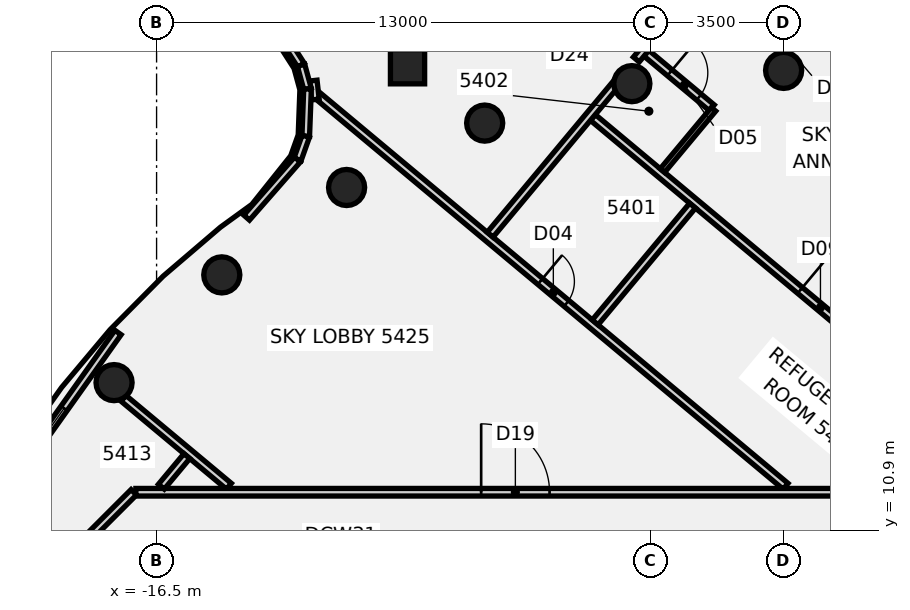
"""IFC4 building model, lengths in metres.
Left out: names, types, materials, properties, quantities, classifications, styles, units other than length and angle.
Written with IfcOpenShell. Run it as: python <this file> out.ifc"""

import sys

from ifc_helpers import new_model, si_unit, direction, frame, frame_2d, origin, origin_2d, place, context, subcontext, project, spatial, rectangle, circle, extrude, element, fill, save


model = new_model("IFC4")
c1 = context("Model", 3, precision=1e-05, world=origin(), true_north=direction((0.0, 1.0)))
c2 = subcontext(c1, "Body", "Model", "MODEL_VIEW")
j1 = project(units=[si_unit("LENGTHUNIT", "METRE"), si_unit("PLANEANGLEUNIT", "RADIAN")], contexts=[c1])
p1 = place(None, origin())
s1 = spatial("IfcSite", under=j1, at=p1, CompositionType="ELEMENT")
p2 = place(p1, origin())
s2 = spatial("IfcBuilding", under=s1, at=p2, CompositionType="ELEMENT")
p3 = place(p2, frame((0.0, 0.0, 214.9)))
s3 = spatial("IfcBuildingStorey", under=s2, at=p3, CompositionType="ELEMENT", Elevation=214.9)
for number, where, z_axis, x_axis in (
    (1, (0.0, 23.0, -0.18), (0.0, 0.0, 1.0), (1.0, 0.0, 0.0)),
    (2, (-3.994, 22.651, -0.18), (0.0, 0.0, 1.0), (1.0, 0.0, 0.0)),
    (3, (-7.866, 21.613, -0.18), (0.0, 0.0, 1.0), (1.0, 0.0, 0.0)),
    (4, (-11.5, 19.919, -0.18), (0.0, 0.0, 1.0), (1.0, 0.0, 0.0)),
    (5, (-14.784, 17.619, -0.18), (0.0, 0.0, 1.0), (1.0, 0.0, 0.0)),
    (6, (-17.619, 14.784, -0.18), (0.0, 0.0, 1.0), (1.0, 0.0, 0.0)),
):
    element("IfcColumn", number, at=place(p3, frame(where, z_axis=z_axis, x_axis=x_axis)), inside=s3, PredefinedType="COLUMN", context=c2, shape_type="SweptSolid", body=[
        extrude(circle(Radius=0.475, at=origin_2d()), origin(), (0.0, 0.0, 1.0), 5.04),
    ])
p4 = place(p3, frame((-9.896, 23.096, -0.174), z_axis=(-0.00363877131, -0.03580550969, 0.999352152556), x_axis=(0.640801875223, 0.767126989756, 0.029818422132)))
e7 = element("IfcColumn", 7, at=p4, inside=s3, PredefinedType="COLUMN", context=c2, shape_type="SweptSolid", body=[
    extrude(rectangle(XDim=0.9, YDim=0.9, at=origin_2d()), origin(), (0.0, 0.0, 1.0), 5.032),
])
p5 = place(p3, frame((-17.37, 14.371, 0.0), z_axis=(0.0, 0.0, 1.0), x_axis=(0.767916419385, -0.640550054905, 0.0)))
e8 = element("IfcWall", 8, at=p5, inside=s3, PredefinedType="PARTITIONING", context=c2, shape_type="SweptSolid", body=[
    extrude(rectangle(XDim=3.611, YDim=0.2, at=frame_2d((1.806, 0.0))), origin(), (0.0, 0.0, 1.0), 4.16),
])
p6 = place(p3, frame((-12.256, 22.329, 0.0), z_axis=(0.0, 0.0, 1.0), x_axis=(0.767726730688, -0.640777392693, 0.0)))
e9 = element("IfcWall", 9, at=p6, inside=s3, PredefinedType="PARTITIONING", context=c2, shape_type="SweptSolid", body=[
    extrude(rectangle(XDim=16.031, YDim=0.2, at=frame_2d((8.016, 0.0))), origin(), (0.0, 0.0, 1.0), 4.16),
])
p7 = place(p6, frame((7.62, 0.0, 0.0)))
e10 = element("IfcOpeningElement", 10, at=p7, cuts=e9, PredefinedType="OPENING", context=c2, shape_type="SweptSolid", body=[
    extrude(rectangle(XDim=0.9, YDim=2.1, at=frame_2d((0.45, 1.05))), frame((0.0, 0.11, 0.0), z_axis=(0.0, -1.0, 0.0), x_axis=(1.0, 0.0, 0.0)), (0.0, 0.0, 1.0), 0.22),
])
p8 = place(p3, frame((-10.519, 29.217, 0.0), z_axis=(0.0, 0.0, 1.0), x_axis=(0.767759961509, -0.640737576161, 0.0)))
e11 = element("IfcWall", 11, at=p8, inside=s3, PredefinedType="PARTITIONING", context=c2, shape_type="SweptSolid", body=[
    extrude(rectangle(XDim=11.24, YDim=0.2, at=frame_2d((5.62, 0.0))), origin(), (0.0, 0.0, 1.0), 4.16),
])
p9 = place(p8, frame((9.8, 0.0, 0.0)))
e12 = element("IfcOpeningElement", 12, at=p9, cuts=e11, PredefinedType="OPENING", context=c2, shape_type="SweptSolid", body=[
    extrude(rectangle(XDim=1.0, YDim=2.1, at=frame_2d((0.5, 1.05))), frame((0.0, 0.11, 0.0), z_axis=(0.0, -1.0, 0.0), x_axis=(1.0, 0.0, 0.0)), (0.0, 0.0, 1.0), 0.22),
])
p10 = place(p8, frame((4.7, 0.0, 0.0)))
e13 = element("IfcOpeningElement", 13, at=p10, cuts=e11, PredefinedType="OPENING", context=c2, shape_type="SweptSolid", body=[
    extrude(rectangle(XDim=1.8, YDim=2.1, at=frame_2d((0.9, 1.05))), frame((0.0, 0.11, 0.0), z_axis=(0.0, -1.0, 0.0), x_axis=(1.0, 0.0, 0.0)), (0.0, 0.0, 1.0), 0.22),
])
p11 = place(p3, frame((-5.019, 21.761, 0.0), z_axis=(0.0, 0.0, 1.0), x_axis=(0.767714934774, -0.640791525323, 0.0)))
e14 = element("IfcWall", 14, at=p11, inside=s3, PredefinedType="PARTITIONING", context=c2, shape_type="SweptSolid", body=[
    extrude(rectangle(XDim=15.144, YDim=0.2, at=frame_2d((7.572, 0.0))), origin(), (0.0, 0.0, 1.0), 4.16),
])
p12 = place(p11, frame((7.1, 0.0, 0.0)))
e15 = element("IfcOpeningElement", 15, at=p12, cuts=e14, PredefinedType="OPENING", context=c2, shape_type="SweptSolid", body=[
    extrude(rectangle(XDim=1.4, YDim=2.1, at=frame_2d((0.7, 1.05))), frame((0.0, 0.11, 0.0), z_axis=(0.0, -1.0, 0.0), x_axis=(1.0, 0.0, 0.0)), (0.0, 0.0, 1.0), 0.22),
])
p13 = place(p3, frame((-0.662, 26.981, 0.0), z_axis=(0.0, 0.0, 1.0), x_axis=(0.767770033975, -0.640725506695, 0.0)))
e16 = element("IfcWall", 16, at=p13, inside=s3, PredefinedType="PARTITIONING", context=c2, shape_type="SweptSolid", body=[
    extrude(rectangle(XDim=6.123, YDim=0.2, at=frame_2d((3.061, 0.0))), origin(), (0.0, 0.0, 1.0), 4.16),
])
p14 = place(p13, frame((2.45, 0.0, 0.0)))
e17 = element("IfcOpeningElement", 17, at=p14, cuts=e16, PredefinedType="OPENING", context=c2, shape_type="SweptSolid", body=[
    extrude(rectangle(XDim=0.9, YDim=2.1, at=frame_2d((0.45, 1.05))), frame((0.0, 0.11, 0.0), z_axis=(0.0, -1.0, 0.0), x_axis=(1.0, 0.0, 0.0)), (0.0, 0.0, 1.0), 0.22),
])
p15 = place(p3, frame((-17.045, 11.9, 0.0), z_axis=(0.0, 0.0, 1.0), x_axis=(1.0, 0.0, 0.0)))
e18 = element("IfcWall", 18, at=p15, inside=s3, PredefinedType="PARTITIONING", context=c2, shape_type="SweptSolid", body=[
    extrude(rectangle(XDim=34.145, YDim=0.2, at=frame_2d((17.073, 0.0))), origin(), (0.0, 0.0, 1.0), 4.16),
])
p16 = place(p15, frame((24.44, 0.0, 0.0)))
e19 = element("IfcOpeningElement", 19, at=p16, cuts=e18, PredefinedType="OPENING", context=c2, shape_type="SweptSolid", body=[
    extrude(rectangle(XDim=1.8, YDim=2.1, at=frame_2d((0.9, 1.05))), frame((0.0, 0.11, 0.0), z_axis=(0.0, -1.0, 0.0), x_axis=(1.0, 0.0, 0.0)), (0.0, 0.0, 1.0), 0.22),
])
p17 = place(p15, frame((9.086, 0.0, 0.0)))
e20 = element("IfcOpeningElement", 20, at=p17, cuts=e18, PredefinedType="OPENING", context=c2, shape_type="SweptSolid", body=[
    extrude(rectangle(XDim=1.8, YDim=2.1, at=frame_2d((0.9, 1.05))), frame((0.0, 0.11, 0.0), z_axis=(0.0, -1.0, 0.0), x_axis=(1.0, 0.0, 0.0)), (0.0, 0.0, 1.0), 0.22),
])
p18 = place(p3, frame((-18.858, 10.142, 0.0), z_axis=(0.0, 0.0, 1.0), x_axis=(0.707106781187, 0.707106781187, 0.0)))
e21 = element("IfcWall", 21, at=p18, inside=s3, PredefinedType="PARTITIONING", context=c2, shape_type="SweptSolid", body=[
    extrude(rectangle(XDim=2.486, YDim=0.2, at=frame_2d((1.243, 0.0))), origin(), (0.0, 0.0, 1.0), 4.16),
])
p19 = place(p3, frame((-16.375, 12.046, 0.0), z_axis=(0.0, 0.0, 1.0), x_axis=(0.640757178851, 0.767743601569, 0.0)))
e22 = element("IfcWall", 22, at=p19, inside=s3, PredefinedType="PARTITIONING", context=c2, shape_type="SweptSolid", body=[
    extrude(rectangle(XDim=1.048, YDim=0.2, at=frame_2d((0.524, 0.0))), origin(), (0.0, 0.0, 1.0), 4.16),
])
p20 = place(p3, frame((-7.723, 18.677, 0.0), z_axis=(0.0, 0.0, 1.0), x_axis=(0.640682845605, 0.767805633834, 0.0)))
e23 = element("IfcWall", 23, at=p20, inside=s3, PredefinedType="PARTITIONING", context=c2, shape_type="SweptSolid", body=[
    extrude(rectangle(XDim=5.491, YDim=0.2, at=frame_2d((2.745, 0.0))), origin(), (0.0, 0.0, 1.0), 4.16),
])
p21 = place(p3, frame((-3.877, 23.286, 0.0), z_axis=(0.0, 0.0, 1.0), x_axis=(0.640673591949, 0.767813355302, 0.0)))
e24 = element("IfcWall", 24, at=p21, inside=s3, PredefinedType="PARTITIONING", context=c2, shape_type="SweptSolid", body=[
    extrude(rectangle(XDim=8.196, YDim=0.2, at=frame_2d((4.098, 0.0))), origin(), (0.0, 0.0, 1.0), 4.16),
])
p22 = place(p21, frame((0.897, 0.0, 0.0)))
e25 = element("IfcOpeningElement", 25, at=p22, cuts=e24, PredefinedType="OPENING", context=c2, shape_type="SweptSolid", body=[
    extrude(rectangle(XDim=1.4, YDim=2.1, at=frame_2d((0.7, 1.05))), frame((0.0, 0.11, 0.0), z_axis=(0.0, -1.0, 0.0), x_axis=(1.0, 0.0, 0.0)), (0.0, 0.0, 1.0), 0.22),
])
p23 = place(p3, frame((-4.959, 16.37, 0.0), z_axis=(0.0, 0.0, 1.0), x_axis=(0.64071252412, 0.76778086811, 0.0)))
e26 = element("IfcWall", 26, at=p23, inside=s3, PredefinedType="PARTITIONING", context=c2, shape_type="SweptSolid", body=[
    extrude(rectangle(XDim=4.0, YDim=0.2, at=frame_2d((2.0, 0.0))), origin(), (0.0, 0.0, 1.0), 4.16),
])
p24 = place(p3, frame((-3.189, 20.364, 0.0), z_axis=(0.0, 0.0, 1.0), x_axis=(0.640573180371, 0.767897128911, 0.0)))
e27 = element("IfcWall", 27, at=p24, inside=s3, PredefinedType="PARTITIONING", context=c2, shape_type="SweptSolid", body=[
    extrude(rectangle(XDim=2.1, YDim=0.15, at=frame_2d((1.05, 0.0))), origin(), (0.0, 0.0, 1.0), 4.16),
])
p25 = place(p3, frame((-12.377, 22.731, 0.0), z_axis=(0.0, 0.0, 1.0), x_axis=(0.112307083986, -0.993673547442, 0.0)))
e28 = element("IfcWall", 28, at=p25, inside=s3, PredefinedType="PARTITIONING", context=c2, shape_type="SweptSolid", body=[
    extrude(rectangle(XDim=0.5, YDim=0.2, at=frame_2d((0.25, 0.0))), origin(), (0.0, 0.0, 1.0), 4.16),
])
p26 = place(p3, frame((-13.438, 24.287, 0.0), z_axis=(0.0, 0.0, 1.0), x_axis=(0.540343058881, -0.841444816205, 0.0)))
e29 = element("IfcWall", 29, at=p26, inside=s3, PredefinedType="SOLIDWALL", context=c2, shape_type="SweptSolid", body=[
    extrude(rectangle(XDim=1.369, YDim=0.2, at=frame_2d((0.685, 0.0))), origin(), (0.0, 0.0, 1.0), 4.86),
])
p27 = place(p3, frame((-12.698, 23.135, 0.0), z_axis=(0.0, 0.0, 1.0), x_axis=(0.263532690811, -0.964650465648, 0.0)))
e30 = element("IfcWall", 30, at=p27, inside=s3, PredefinedType="SOLIDWALL", context=c2, shape_type="SweptSolid", body=[
    extrude(rectangle(XDim=0.647, YDim=0.2, at=frame_2d((0.323, 0.0))), origin(), (0.0, 0.0, 1.0), 4.86),
])
p28 = place(p3, frame((-12.528, 22.511, 0.0), z_axis=(0.0, 0.0, 1.0), x_axis=(-0.037627776093, -0.999291824477, 0.0)))
e31 = element("IfcWall", 31, at=p28, inside=s3, PredefinedType="SOLIDWALL", context=c2, shape_type="SweptSolid", body=[
    extrude(rectangle(XDim=1.246, YDim=0.2, at=frame_2d((0.623, 0.0))), origin(), (0.0, 0.0, 1.0), 4.86),
])
p29 = place(p3, frame((-12.575, 21.266, 0.0), z_axis=(0.0, 0.0, 1.0), x_axis=(-0.335669576077, -0.9419797958, 0.0)))
e32 = element("IfcWall", 32, at=p29, inside=s3, PredefinedType="SOLIDWALL", context=c2, shape_type="SweptSolid", body=[
    extrude(rectangle(XDim=0.649, YDim=0.2, at=frame_2d((0.325, 0.0))), origin(), (0.0, 0.0, 1.0), 4.86),
])
p30 = place(p3, frame((-12.793, 20.655, 0.0), z_axis=(0.0, 0.0, 1.0), x_axis=(-0.658742820899, -0.752368191722, 0.0)))
e33 = element("IfcWall", 33, at=p30, inside=s3, PredefinedType="SOLIDWALL", context=c2, shape_type="SweptSolid", body=[
    extrude(rectangle(XDim=2.031, YDim=0.2, at=frame_2d((1.016, 0.0))), origin(), (0.0, 0.0, 1.0), 4.86),
])
p31 = place(p3, frame((-17.515, 16.103, 0.0), z_axis=(0.0, 0.0, 1.0), x_axis=(-0.57952016676, -0.814957898495, 0.0)))
e34 = element("IfcWall", 34, at=p31, inside=s3, PredefinedType="SOLIDWALL", context=c2, shape_type="SweptSolid", body=[
    extrude(rectangle(XDim=5.973, YDim=0.2, at=frame_2d((2.986, 0.0))), origin(), (0.0, 0.0, 1.0), 4.86),
])
p32 = place(p31, frame((2.445, 0.0, 1.4)))
e35 = element("IfcOpeningElement", 35, at=p32, cuts=e34, PredefinedType="OPENING", context=c2, shape_type="SweptSolid", body=[
    extrude(rectangle(XDim=2.4, YDim=2.1, at=frame_2d((1.2, 1.05))), frame((0.0, 0.11, 0.0), z_axis=(0.0, -1.0, 0.0), x_axis=(1.0, 0.0, 0.0)), (0.0, 0.0, 1.0), 0.22),
])
p33 = place(p7, origin())
e36 = element("IfcDoor", 36, at=p33, inside=s3, OperationType="SINGLE_SWING_LEFT", PredefinedType="DOOR", context=c2, shape_type="SweptSolid", body=[
    extrude(rectangle(XDim=0.9, YDim=2.1, at=frame_2d((0.45, 1.05))), frame((0.0, 0.025, 0.0), z_axis=(0.0, -1.0, 0.0), x_axis=(1.0, 0.0, 0.0)), (0.0, 0.0, 1.0), 0.05),
])
fill(e10, e36)
p34 = place(p9, frame((1.0, 0.0, 0.0), z_axis=(0.0, 0.0, 1.0), x_axis=(-1.0, 0.0, 0.0)))
e37 = element("IfcDoor", 37, at=p34, inside=s3, OperationType="SINGLE_SWING_RIGHT", PredefinedType="DOOR", context=c2, shape_type="SweptSolid", body=[
    extrude(rectangle(XDim=1.0, YDim=2.1, at=frame_2d((0.5, 1.05))), frame((0.0, 0.025, 0.0), z_axis=(0.0, -1.0, 0.0), x_axis=(1.0, 0.0, 0.0)), (0.0, 0.0, 1.0), 0.05),
])
fill(e12, e37)
p35 = place(p12, frame((1.4, 0.0, 0.0), z_axis=(0.0, 0.0, 1.0), x_axis=(-1.0, 0.0, 0.0)))
e38 = element("IfcDoor", 38, at=p35, inside=s3, OperationType="DOUBLE_DOOR_SINGLE_SWING", PredefinedType="DOOR", context=c2, shape_type="SweptSolid", body=[
    extrude(rectangle(XDim=1.4, YDim=2.1, at=frame_2d((0.7, 1.05))), frame((0.0, 0.025, 0.0), z_axis=(0.0, -1.0, 0.0), x_axis=(1.0, 0.0, 0.0)), (0.0, 0.0, 1.0), 0.05),
])
fill(e15, e38)
p36 = place(p17, frame((1.8, 0.0, 0.0), z_axis=(0.0, 0.0, 1.0), x_axis=(-1.0, 0.0, 0.0)))
e39 = element("IfcDoor", 39, at=p36, inside=s3, OperationType="DOUBLE_DOOR_SINGLE_SWING", PredefinedType="DOOR", context=c2, shape_type="SweptSolid", body=[
    extrude(rectangle(XDim=1.8, YDim=2.1, at=frame_2d((0.9, 1.05))), frame((0.0, 0.025, 0.0), z_axis=(0.0, -1.0, 0.0), x_axis=(1.0, 0.0, 0.0)), (0.0, 0.0, 1.0), 0.05),
])
fill(e20, e39)
p37 = place(p32, origin())
e40 = element("IfcWindow", 40, at=p37, inside=s3, PartitioningType="SINGLE_PANEL", PredefinedType="WINDOW", context=c2, shape_type="SweptSolid", body=[
    extrude(rectangle(XDim=2.4, YDim=2.1, at=frame_2d((1.2, 1.05))), frame((0.0, 0.03, 0.0), z_axis=(0.0, -1.0, 0.0), x_axis=(1.0, 0.0, 0.0)), (0.0, 0.0, 1.0), 0.06),
])
fill(e35, e40)
save(model, sys.argv[1])
